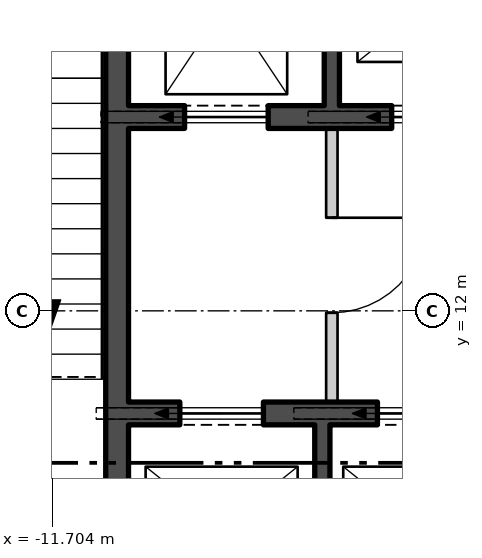
"""IFC4 building model, lengths in metres.
Left out: names, types, materials, properties, quantities, classifications, styles, units other than length and angle.
Written with IfcOpenShell. Run it as: python <this file> out.ifc"""

import sys

from ifc_helpers import new_model, si_unit, direction, frame, frame_2d, origin, place, context, subcontext, project, spatial, polyline, rectangle, outline, extrude, element, fill, save


model = new_model("IFC4")
c1 = context("Model", 3, precision=1e-05, world=origin(), true_north=direction((0.0, 1.0)))
c2 = subcontext(c1, "Body", "Model", "MODEL_VIEW")
j1 = project(units=[si_unit("LENGTHUNIT", "METRE"), si_unit("PLANEANGLEUNIT", "RADIAN")], contexts=[c1])
p1 = place(None, origin())
s1 = spatial("IfcSite", under=j1, at=p1, CompositionType="ELEMENT")
p2 = place(p1, origin())
s2 = spatial("IfcBuilding", under=s1, at=p2, CompositionType="ELEMENT")
p3 = place(p2, frame((0.0, 0.0, 216.0)))
s3 = spatial("IfcBuildingStorey", under=s2, at=p3, CompositionType="ELEMENT", Elevation=216.0)
p4 = place(p3, frame((-26.235, 14.155, -0.18), z_axis=(0.0, 0.0, 1.0), x_axis=(0.500000335318, -0.866025210188, 0.0)))
e1 = element("IfcWall", 1, at=p4, inside=s3, PredefinedType="SOLIDWALL", context=c2, shape_type="SweptSolid", body=[
    extrude(outline(polyline([(-0.13, -0.225), (45.88, -0.225), (45.62, 0.225), (0.13, 0.225), (-0.13, -0.225)])), origin(), (0.0, 0.0, 1.0), 3.68),
])
p5 = place(p4, frame((1.425, 0.0, 1.08)))
e2 = element("IfcOpeningElement", 2, at=p5, cuts=e1, PredefinedType="OPENING", context=c2, shape_type="SweptSolid", body=[
    extrude(rectangle(XDim=2.4, YDim=2.0, at=frame_2d((1.2, 1.0))), frame((0.0, 0.235, 0.0), z_axis=(0.0, -1.0, 0.0), x_axis=(1.0, 0.0, 0.0)), (0.0, 0.0, 1.0), 0.47),
])
p6 = place(p4, frame((5.895, 0.0, 1.08)))
e3 = element("IfcOpeningElement", 3, at=p6, cuts=e1, PredefinedType="OPENING", context=c2, shape_type="SweptSolid", body=[
    extrude(rectangle(XDim=2.4, YDim=2.0, at=frame_2d((1.2, 1.0))), frame((0.0, 0.235, 0.0), z_axis=(0.0, -1.0, 0.0), x_axis=(1.0, 0.0, 0.0)), (0.0, 0.0, 1.0), 0.47),
])
p7 = place(p4, frame((10.403, 0.0, 1.08)))
e4 = element("IfcOpeningElement", 4, at=p7, cuts=e1, PredefinedType="OPENING", context=c2, shape_type="SweptSolid", body=[
    extrude(rectangle(XDim=2.4, YDim=2.0, at=frame_2d((1.2, 1.0))), frame((0.0, 0.235, 0.0), z_axis=(0.0, -1.0, 0.0), x_axis=(1.0, 0.0, 0.0)), (0.0, 0.0, 1.0), 0.47),
])
p8 = place(p4, frame((19.421, 0.0, 1.08)))
e5 = element("IfcOpeningElement", 5, at=p8, cuts=e1, PredefinedType="OPENING", context=c2, shape_type="SweptSolid", body=[
    extrude(rectangle(XDim=2.4, YDim=2.0, at=frame_2d((1.2, 1.0))), frame((0.0, 0.235, 0.0), z_axis=(0.0, -1.0, 0.0), x_axis=(1.0, 0.0, 0.0)), (0.0, 0.0, 1.0), 0.47),
])
p9 = place(p4, frame((23.929, 0.0, 1.08)))
e6 = element("IfcOpeningElement", 6, at=p9, cuts=e1, PredefinedType="OPENING", context=c2, shape_type="SweptSolid", body=[
    extrude(rectangle(XDim=2.4, YDim=2.0, at=frame_2d((1.2, 1.0))), frame((0.0, 0.235, 0.0), z_axis=(0.0, -1.0, 0.0), x_axis=(1.0, 0.0, 0.0)), (0.0, 0.0, 1.0), 0.47),
])
p10 = place(p4, frame((28.438, 0.0, 1.08)))
e7 = element("IfcOpeningElement", 7, at=p10, cuts=e1, PredefinedType="OPENING", context=c2, shape_type="SweptSolid", body=[
    extrude(rectangle(XDim=2.4, YDim=2.0, at=frame_2d((1.2, 1.0))), frame((0.0, 0.235, 0.0), z_axis=(0.0, -1.0, 0.0), x_axis=(1.0, 0.0, 0.0)), (0.0, 0.0, 1.0), 0.47),
])
p11 = place(p4, frame((32.947, 0.0, 1.08)))
e8 = element("IfcOpeningElement", 8, at=p11, cuts=e1, PredefinedType="OPENING", context=c2, shape_type="SweptSolid", body=[
    extrude(rectangle(XDim=2.4, YDim=2.0, at=frame_2d((1.2, 1.0))), frame((0.0, 0.235, 0.0), z_axis=(0.0, -1.0, 0.0), x_axis=(1.0, 0.0, 0.0)), (0.0, 0.0, 1.0), 0.47),
])
p12 = place(p4, frame((41.925, 0.0, 1.08)))
e9 = element("IfcOpeningElement", 9, at=p12, cuts=e1, PredefinedType="OPENING", context=c2, shape_type="SweptSolid", body=[
    extrude(rectangle(XDim=2.4, YDim=2.0, at=frame_2d((1.2, 1.0))), frame((0.0, 0.235, 0.0), z_axis=(0.0, -1.0, 0.0), x_axis=(1.0, 0.0, 0.0)), (0.0, 0.0, 1.0), 0.47),
])
p13 = place(p3, frame((-10.85, 2.45, 0.0), z_axis=(0.0, 0.0, 1.0), x_axis=(0.0, 1.0, 0.0)))
e10 = element("IfcWall", 10, at=p13, inside=s3, PredefinedType="SHEAR", context=c2, shape_type="SweptSolid", body=[
    extrude(rectangle(XDim=15.1, YDim=0.3, at=frame_2d((7.55, 0.0))), origin(), (0.0, 0.0, 1.0), 3.7),
])
p14 = place(p13, frame((3.525, 0.0, 0.0)))
e11 = element("IfcOpeningElement", 11, at=p14, cuts=e10, PredefinedType="OPENING", context=c2, shape_type="SweptSolid", body=[
    extrude(rectangle(XDim=1.25, YDim=2.1, at=frame_2d((0.625, 1.05))), frame((0.0, 0.16, 0.0), z_axis=(0.0, -1.0, 0.0), x_axis=(1.0, 0.0, 0.0)), (0.0, 0.0, 1.0), 0.32),
])
p15 = place(p13, frame((1.15, 0.0, 0.0)))
e12 = element("IfcOpeningElement", 12, at=p15, cuts=e10, PredefinedType="OPENING", context=c2, shape_type="SweptSolid", body=[
    extrude(rectangle(XDim=1.0, YDim=2.1, at=frame_2d((0.5, 1.05))), frame((0.0, 0.16, 0.0), z_axis=(0.0, -1.0, 0.0), x_axis=(1.0, 0.0, 0.0)), (0.0, 0.0, 1.0), 0.32),
])
p16 = place(p3, frame((-10.7, 14.55, 0.0), z_axis=(0.0, 0.0, 1.0), x_axis=(1.0, 0.0, 0.0)))
e13 = element("IfcWall", 13, at=p16, inside=s3, PredefinedType="SHEAR", context=c2, shape_type="SweptSolid", body=[
    extrude(rectangle(XDim=21.4, YDim=0.3, at=frame_2d((10.7, 0.0))), origin(), (0.0, 0.0, 1.0), 3.7),
])
p17 = place(p16, frame((0.738, 0.0, 0.0)))
e14 = element("IfcOpeningElement", 14, at=p17, cuts=e13, PredefinedType="OPENING", context=c2, shape_type="SweptSolid", body=[
    extrude(rectangle(XDim=1.1, YDim=2.1, at=frame_2d((0.55, 1.05))), frame((0.0, 0.16, 0.0), z_axis=(0.0, -1.0, 0.0), x_axis=(1.0, 0.0, 0.0)), (0.0, 0.0, 1.0), 0.32),
])
p18 = place(p16, frame((3.462, 0.0, 0.0)))
e15 = element("IfcOpeningElement", 15, at=p18, cuts=e13, PredefinedType="OPENING", context=c2, shape_type="SweptSolid", body=[
    extrude(rectangle(XDim=1.1, YDim=2.1, at=frame_2d((0.55, 1.05))), frame((0.0, 0.16, 0.0), z_axis=(0.0, -1.0, 0.0), x_axis=(1.0, 0.0, 0.0)), (0.0, 0.0, 1.0), 0.32),
])
p19 = place(p16, frame((6.138, 0.0, 0.0)))
e16 = element("IfcOpeningElement", 16, at=p19, cuts=e13, PredefinedType="OPENING", context=c2, shape_type="SweptSolid", body=[
    extrude(rectangle(XDim=1.1, YDim=2.1, at=frame_2d((0.55, 1.05))), frame((0.0, 0.16, 0.0), z_axis=(0.0, -1.0, 0.0), x_axis=(1.0, 0.0, 0.0)), (0.0, 0.0, 1.0), 0.32),
])
p20 = place(p16, frame((8.812, 0.0, 0.0)))
e17 = element("IfcOpeningElement", 17, at=p20, cuts=e13, PredefinedType="OPENING", context=c2, shape_type="SweptSolid", body=[
    extrude(rectangle(XDim=1.1, YDim=2.1, at=frame_2d((0.55, 1.05))), frame((0.0, 0.16, 0.0), z_axis=(0.0, -1.0, 0.0), x_axis=(1.0, 0.0, 0.0)), (0.0, 0.0, 1.0), 0.32),
])
p21 = place(p16, frame((19.562, 0.0, 0.0)))
e18 = element("IfcOpeningElement", 18, at=p21, cuts=e13, PredefinedType="OPENING", context=c2, shape_type="SweptSolid", body=[
    extrude(rectangle(XDim=1.1, YDim=2.1, at=frame_2d((0.55, 1.05))), frame((0.0, 0.16, 0.0), z_axis=(0.0, -1.0, 0.0), x_axis=(1.0, 0.0, 0.0)), (0.0, 0.0, 1.0), 0.32),
])
p22 = place(p16, frame((12.875, 0.0, 0.0)))
e19 = element("IfcOpeningElement", 19, at=p22, cuts=e13, PredefinedType="OPENING", context=c2, shape_type="SweptSolid", body=[
    extrude(rectangle(XDim=1.0, YDim=2.1, at=frame_2d((0.5, 1.05))), frame((0.0, 0.16, 0.0), z_axis=(0.0, -1.0, 0.0), x_axis=(1.0, 0.0, 0.0)), (0.0, 0.0, 1.0), 0.32),
])
p23 = place(p16, frame((16.887, 0.0, 0.0)))
e20 = element("IfcOpeningElement", 20, at=p23, cuts=e13, PredefinedType="OPENING", context=c2, shape_type="SweptSolid", body=[
    extrude(rectangle(XDim=1.0, YDim=2.1, at=frame_2d((0.5, 1.05))), frame((0.0, 0.16, 0.0), z_axis=(0.0, -1.0, 0.0), x_axis=(1.0, 0.0, 0.0)), (0.0, 0.0, 1.0), 0.32),
])
p24 = place(p3, frame((-10.7, 10.65, 0.0), z_axis=(0.0, 0.0, 1.0), x_axis=(1.0, 0.0, 0.0)))
e21 = element("IfcWall", 21, at=p24, inside=s3, PredefinedType="SHEAR", context=c2, shape_type="SweptSolid", body=[
    extrude(rectangle(XDim=10.3, YDim=0.3, at=frame_2d((5.15, 0.0))), origin(), (0.0, 0.0, 1.0), 3.7),
])
p25 = place(p24, frame((0.675, 0.0, 0.0)))
e22 = element("IfcOpeningElement", 22, at=p25, cuts=e21, PredefinedType="OPENING", context=c2, shape_type="SweptSolid", body=[
    extrude(rectangle(XDim=1.1, YDim=2.1, at=frame_2d((0.55, 1.05))), frame((0.0, 0.16, 0.0), z_axis=(0.0, -1.0, 0.0), x_axis=(1.0, 0.0, 0.0)), (0.0, 0.0, 1.0), 0.32),
])
p26 = place(p24, frame((3.275, 0.0, 0.0)))
e23 = element("IfcOpeningElement", 23, at=p26, cuts=e21, PredefinedType="OPENING", context=c2, shape_type="SweptSolid", body=[
    extrude(rectangle(XDim=1.1, YDim=2.1, at=frame_2d((0.55, 1.05))), frame((0.0, 0.16, 0.0), z_axis=(0.0, -1.0, 0.0), x_axis=(1.0, 0.0, 0.0)), (0.0, 0.0, 1.0), 0.32),
])
p27 = place(p24, frame((5.825, 0.0, 0.0)))
e24 = element("IfcOpeningElement", 24, at=p27, cuts=e21, PredefinedType="OPENING", context=c2, shape_type="SweptSolid", body=[
    extrude(rectangle(XDim=1.1, YDim=2.1, at=frame_2d((0.55, 1.05))), frame((0.0, 0.16, 0.0), z_axis=(0.0, -1.0, 0.0), x_axis=(1.0, 0.0, 0.0)), (0.0, 0.0, 1.0), 0.32),
])
p28 = place(p24, frame((8.425, 0.0, 0.0)))
e25 = element("IfcOpeningElement", 25, at=p28, cuts=e21, PredefinedType="OPENING", context=c2, shape_type="SweptSolid", body=[
    extrude(rectangle(XDim=1.0, YDim=2.1, at=frame_2d((0.5, 1.05))), frame((0.0, 0.16, 0.0), z_axis=(0.0, -1.0, 0.0), x_axis=(1.0, 0.0, 0.0)), (0.0, 0.0, 1.0), 0.32),
])
p29 = place(p3, frame((-8.025, 14.7, 0.0), z_axis=(0.0, 0.0, 1.0), x_axis=(0.0, 1.0, 0.0)))
e26 = element("IfcWall", 26, at=p29, inside=s3, PredefinedType="SHEAR", context=c2, shape_type="SweptSolid", body=[
    extrude(rectangle(XDim=2.85, YDim=0.2, at=frame_2d((1.425, 0.0))), origin(), (0.0, 0.0, 1.0), 3.7),
])
p30 = place(p3, frame((-8.15, 7.8, 0.0), z_axis=(0.0, 0.0, 1.0), x_axis=(0.0, 1.0, 0.0)))
e27 = element("IfcWall", 27, at=p30, inside=s3, PredefinedType="SHEAR", context=c2, shape_type="SweptSolid", body=[
    extrude(rectangle(XDim=2.7, YDim=0.2, at=frame_2d((1.35, 0.0))), origin(), (0.0, 0.0, 1.0), 3.7),
])
p31 = place(p3, frame((-8.025, 10.8, 0.0), z_axis=(0.0, 0.0, 1.0), x_axis=(0.0, 1.0, 0.0)))
e28 = element("IfcWall", 28, at=p31, inside=s3, PredefinedType="PARTITIONING", context=c2, shape_type="SweptSolid", body=[
    extrude(rectangle(XDim=3.6, YDim=0.15, at=frame_2d((1.8, 0.0))), origin(), (0.0, 0.0, 1.0), 3.7),
])
p32 = place(p31, frame((1.175, 0.0, 0.0)))
e29 = element("IfcOpeningElement", 29, at=p32, cuts=e28, PredefinedType="OPENING", context=c2, shape_type="SweptSolid", body=[
    extrude(rectangle(XDim=1.25, YDim=2.1, at=frame_2d((0.625, 1.05))), frame((0.0, 0.085, 0.0), z_axis=(0.0, -1.0, 0.0), x_axis=(1.0, 0.0, 0.0)), (0.0, 0.0, 1.0), 0.17),
])
p33 = place(p17, origin())
e30 = element("IfcDoor", 30, at=p33, inside=s3, OperationType="SLIDING_TO_LEFT", PredefinedType="DOOR", context=c2, shape_type="SweptSolid", body=[
    extrude(rectangle(XDim=1.1, YDim=2.1, at=frame_2d((0.55, 1.05))), frame((0.0, 0.025, 0.0), z_axis=(0.0, -1.0, 0.0), x_axis=(1.0, 0.0, 0.0)), (0.0, 0.0, 1.0), 0.05),
])
fill(e14, e30)
p34 = place(p18, origin())
e31 = element("IfcDoor", 31, at=p34, inside=s3, OperationType="SLIDING_TO_LEFT", PredefinedType="DOOR", context=c2, shape_type="SweptSolid", body=[
    extrude(rectangle(XDim=1.1, YDim=2.1, at=frame_2d((0.55, 1.05))), frame((0.0, 0.025, 0.0), z_axis=(0.0, -1.0, 0.0), x_axis=(1.0, 0.0, 0.0)), (0.0, 0.0, 1.0), 0.05),
])
fill(e15, e31)
p35 = place(p25, origin())
e32 = element("IfcDoor", 32, at=p35, inside=s3, OperationType="SLIDING_TO_LEFT", PredefinedType="DOOR", context=c2, shape_type="SweptSolid", body=[
    extrude(rectangle(XDim=1.1, YDim=2.1, at=frame_2d((0.55, 1.05))), frame((0.0, 0.025, 0.0), z_axis=(0.0, -1.0, 0.0), x_axis=(1.0, 0.0, 0.0)), (0.0, 0.0, 1.0), 0.05),
])
fill(e22, e32)
p36 = place(p26, origin())
e33 = element("IfcDoor", 33, at=p36, inside=s3, OperationType="SLIDING_TO_LEFT", PredefinedType="DOOR", context=c2, shape_type="SweptSolid", body=[
    extrude(rectangle(XDim=1.1, YDim=2.1, at=frame_2d((0.55, 1.05))), frame((0.0, 0.025, 0.0), z_axis=(0.0, -1.0, 0.0), x_axis=(1.0, 0.0, 0.0)), (0.0, 0.0, 1.0), 0.05),
])
fill(e23, e33)
p37 = place(p32, origin())
e34 = element("IfcDoor", 34, at=p37, inside=s3, OperationType="SINGLE_SWING_RIGHT", PredefinedType="DOOR", context=c2, shape_type="SweptSolid", body=[
    extrude(rectangle(XDim=1.25, YDim=2.1, at=frame_2d((0.625, 1.05))), frame((0.0, 0.025, 0.0), z_axis=(0.0, -1.0, 0.0), x_axis=(1.0, 0.0, 0.0)), (0.0, 0.0, 1.0), 0.05),
])
fill(e29, e34)
save(model, sys.argv[1])
